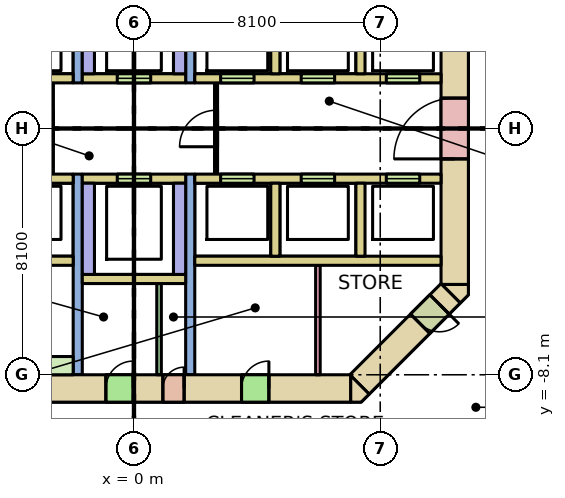
"""IFC4 building model, lengths in metres.
Left out: names, types, materials, properties, quantities, classifications, styles, units other than length and angle.
Written with IfcOpenShell. Run it as: python <this file> out.ifc"""

import sys

from ifc_helpers import new_model, si_unit, direction, frame, frame_2d, origin, place, context, subcontext, project, spatial, polyline, rectangle, outline, extrude, element, fill, save


model = new_model("IFC4")
c1 = context("Model", 3, precision=1e-05, world=origin(), true_north=direction((0.0, 1.0)))
c2 = subcontext(c1, "Body", "Model", "MODEL_VIEW")
j1 = project(units=[si_unit("LENGTHUNIT", "METRE"), si_unit("PLANEANGLEUNIT", "RADIAN")], contexts=[c1])
p1 = place(None, origin())
s1 = spatial("IfcSite", under=j1, at=p1, CompositionType="ELEMENT")
p2 = place(p1, origin())
s2 = spatial("IfcBuilding", under=s1, at=p2, CompositionType="ELEMENT")
p3 = place(p2, frame((0.0, 0.0, -3.6)))
s3 = spatial("IfcBuildingStorey", under=s2, at=p3, CompositionType="ELEMENT", Elevation=-3.6)
p4 = place(p3, frame((-7.13, -8.55, -0.32), z_axis=(0.0, 0.0, 1.0), x_axis=(1.0, 0.0, 0.0)))
e1 = element("IfcWall", 1, at=p4, inside=s3, PredefinedType="SHEAR", context=c2, shape_type="SweptSolid", body=[
    extrude(rectangle(XDim=14.26, YDim=0.9, at=frame_2d((7.13, 0.0))), origin(), (0.0, 0.0, 1.0), 3.6),
])
p5 = place(p4, frame((8.08, 0.0, 0.32)))
e2 = element("IfcOpeningElement", 2, at=p5, cuts=e1, PredefinedType="OPENING", context=c2, shape_type="SweptSolid", body=[
    extrude(rectangle(XDim=0.7, YDim=2.1, at=frame_2d((0.35, 1.05))), frame((0.0, 0.46, 0.0), z_axis=(0.0, -1.0, 0.0), x_axis=(1.0, 0.0, 0.0)), (0.0, 0.0, 1.0), 0.92),
])
p6 = place(p4, frame((6.205, 0.0, 0.32)))
e3 = element("IfcOpeningElement", 3, at=p6, cuts=e1, PredefinedType="OPENING", context=c2, shape_type="SweptSolid", body=[
    extrude(rectangle(XDim=0.9, YDim=2.1, at=frame_2d((0.45, 1.05))), frame((0.0, 0.46, 0.0), z_axis=(0.0, -1.0, 0.0), x_axis=(1.0, 0.0, 0.0)), (0.0, 0.0, 1.0), 0.92),
])
p7 = place(p4, frame((10.667, 0.0, 0.32)))
e4 = element("IfcOpeningElement", 4, at=p7, cuts=e1, PredefinedType="OPENING", context=c2, shape_type="SweptSolid", body=[
    extrude(rectangle(XDim=0.9, YDim=2.1, at=frame_2d((0.45, 1.05))), frame((0.0, 0.46, 0.0), z_axis=(0.0, -1.0, 0.0), x_axis=(1.0, 0.0, 0.0)), (0.0, 0.0, 1.0), 0.92),
])
p8 = place(p3, frame((10.55, -5.13, -0.32), z_axis=(0.0, 0.0, 1.0), x_axis=(0.0, 1.0, 0.0)))
e5 = element("IfcWall", 5, at=p8, inside=s3, PredefinedType="SHEAR", context=c2, shape_type="SweptSolid", body=[
    extrude(rectangle(XDim=10.26, YDim=0.9, at=frame_2d((5.13, 0.0))), origin(), (0.0, 0.0, 1.0), 3.6),
])
p9 = place(p8, frame((4.13, 0.0, 0.32)))
e6 = element("IfcOpeningElement", 6, at=p9, cuts=e5, PredefinedType="OPENING", context=c2, shape_type="SweptSolid", body=[
    extrude(rectangle(XDim=2.0, YDim=2.1, at=frame_2d((1.0, 1.05))), frame((0.0, 0.46, 0.0), z_axis=(0.0, -1.0, 0.0), x_axis=(1.0, 0.0, 0.0)), (0.0, 0.0, 1.0), 0.92),
])
p10 = place(p3, frame((10.418, -5.418, -0.32), z_axis=(0.0, 0.0, 1.0), x_axis=(-0.707106781187, -0.707106781187, 0.0)))
e7 = element("IfcWall", 7, at=p10, inside=s3, PredefinedType="SHEAR", context=c2, shape_type="SweptSolid", body=[
    extrude(rectangle(XDim=4.243, YDim=0.9, at=frame_2d((2.121, 0.0))), origin(), (0.0, 0.0, 1.0), 3.6),
])
p11 = place(p10, frame((0.52, 0.0, 0.32)))
e8 = element("IfcOpeningElement", 8, at=p11, cuts=e7, PredefinedType="OPENING", context=c2, shape_type="SweptSolid", body=[
    extrude(rectangle(XDim=0.9, YDim=2.1, at=frame_2d((0.45, 1.05))), frame((0.0, 0.46, 0.0), z_axis=(0.0, -1.0, 0.0), x_axis=(1.0, 0.0, 0.0)), (0.0, 0.0, 1.0), 0.92),
])
p12 = place(p3, frame((0.0, 0.0, -0.32)))
e9 = element("IfcWall", 9, at=p12, inside=s3, PredefinedType="SHEAR", context=c2, shape_type="SweptSolid", body=[
    extrude(outline(polyline([(7.473, -9.0), (7.13, -9.0), (7.13, -8.13), (7.736, -8.736), (7.473, -9.0)])), origin(), (0.0, 0.0, 1.0), 3.6),
])
p13 = place(p3, frame((0.0, 0.0, -0.32)))
e10 = element("IfcWall", 10, at=p13, inside=s3, PredefinedType="SHEAR", context=c2, shape_type="SweptSolid", body=[
    extrude(outline(polyline([(11.0, -5.473), (10.736, -5.736), (10.13, -5.13), (11.0, -5.13), (11.0, -5.473)])), origin(), (0.0, 0.0, 1.0), 3.6),
])
for number, where, z_axis, x_axis in (
    (11, (-10.1, -4.35, 0.0), (0.0, 0.0, 1.0), (1.0, 0.0, 0.0)),
    (12, (2.0, -4.35, 0.0), (0.0, 0.0, 1.0), (1.0, 0.0, 0.0)),
):
    element("IfcWall", number, at=place(p3, frame(where, z_axis=z_axis, x_axis=x_axis)), inside=s3, PredefinedType="SOLIDWALL", context=c2, shape_type="SweptSolid", body=[
        extrude(rectangle(XDim=8.1, YDim=0.3, at=frame_2d((4.05, 0.0))), origin(), (0.0, 0.0, 1.0), 3.28),
    ])
p14 = place(p3, frame((-10.1, 1.65, 0.0), z_axis=(0.0, 0.0, 1.0), x_axis=(1.0, 0.0, 0.0)))
e13 = element("IfcWall", 13, at=p14, inside=s3, PredefinedType="SOLIDWALL", context=c2, shape_type="SweptSolid", body=[
    extrude(rectangle(XDim=8.1, YDim=0.3, at=frame_2d((4.05, 0.0))), origin(), (0.0, 0.0, 1.0), 3.28),
])
p15 = place(p14, frame((0.7, 0.0, 0.0)))
e14 = element("IfcOpeningElement", 14, at=p15, cuts=e13, PredefinedType="OPENING", context=c2, shape_type="SweptSolid", body=[
    extrude(rectangle(XDim=1.1, YDim=2.1, at=frame_2d((0.55, 1.05))), frame((0.0, 0.16, 0.0), z_axis=(0.0, -1.0, 0.0), x_axis=(1.0, 0.0, 0.0)), (0.0, 0.0, 1.0), 0.32),
])
p16 = place(p14, frame((3.5, 0.0, 0.0)))
e15 = element("IfcOpeningElement", 15, at=p16, cuts=e13, PredefinedType="OPENING", context=c2, shape_type="SweptSolid", body=[
    extrude(rectangle(XDim=1.1, YDim=2.1, at=frame_2d((0.55, 1.05))), frame((0.0, 0.16, 0.0), z_axis=(0.0, -1.0, 0.0), x_axis=(1.0, 0.0, 0.0)), (0.0, 0.0, 1.0), 0.32),
])
p17 = place(p14, frame((6.15, 0.0, 0.0)))
e16 = element("IfcOpeningElement", 16, at=p17, cuts=e13, PredefinedType="OPENING", context=c2, shape_type="SweptSolid", body=[
    extrude(rectangle(XDim=1.1, YDim=2.1, at=frame_2d((0.55, 1.05))), frame((0.0, 0.16, 0.0), z_axis=(0.0, -1.0, 0.0), x_axis=(1.0, 0.0, 0.0)), (0.0, 0.0, 1.0), 0.32),
])
p18 = place(p3, frame((-10.1, -1.65, 0.0), z_axis=(0.0, 0.0, 1.0), x_axis=(1.0, 0.0, 0.0)))
e17 = element("IfcWall", 17, at=p18, inside=s3, PredefinedType="SOLIDWALL", context=c2, shape_type="SweptSolid", body=[
    extrude(rectangle(XDim=8.1, YDim=0.3, at=frame_2d((4.05, 0.0))), origin(), (0.0, 0.0, 1.0), 3.28),
])
p19 = place(p18, frame((0.7, 0.0, 0.0)))
e18 = element("IfcOpeningElement", 18, at=p19, cuts=e17, PredefinedType="OPENING", context=c2, shape_type="SweptSolid", body=[
    extrude(rectangle(XDim=1.1, YDim=2.1, at=frame_2d((0.55, 1.05))), frame((0.0, 0.16, 0.0), z_axis=(0.0, -1.0, 0.0), x_axis=(1.0, 0.0, 0.0)), (0.0, 0.0, 1.0), 0.32),
])
p20 = place(p18, frame((3.5, 0.0, 0.0)))
e19 = element("IfcOpeningElement", 19, at=p20, cuts=e17, PredefinedType="OPENING", context=c2, shape_type="SweptSolid", body=[
    extrude(rectangle(XDim=1.1, YDim=2.1, at=frame_2d((0.55, 1.05))), frame((0.0, 0.16, 0.0), z_axis=(0.0, -1.0, 0.0), x_axis=(1.0, 0.0, 0.0)), (0.0, 0.0, 1.0), 0.32),
])
p21 = place(p18, frame((6.15, 0.0, 0.0)))
e20 = element("IfcOpeningElement", 20, at=p21, cuts=e17, PredefinedType="OPENING", context=c2, shape_type="SweptSolid", body=[
    extrude(rectangle(XDim=1.1, YDim=2.1, at=frame_2d((0.55, 1.05))), frame((0.0, 0.16, 0.0), z_axis=(0.0, -1.0, 0.0), x_axis=(1.0, 0.0, 0.0)), (0.0, 0.0, 1.0), 0.32),
])
p22 = place(p3, frame((2.0, 1.65, 0.0), z_axis=(0.0, 0.0, 1.0), x_axis=(1.0, 0.0, 0.0)))
e21 = element("IfcWall", 21, at=p22, inside=s3, PredefinedType="SOLIDWALL", context=c2, shape_type="SweptSolid", body=[
    extrude(rectangle(XDim=8.1, YDim=0.3, at=frame_2d((4.05, 0.0))), origin(), (0.0, 0.0, 1.0), 3.28),
])
p23 = place(p22, frame((0.85, 0.0, 0.0)))
e22 = element("IfcOpeningElement", 22, at=p23, cuts=e21, PredefinedType="OPENING", context=c2, shape_type="SweptSolid", body=[
    extrude(rectangle(XDim=1.1, YDim=2.1, at=frame_2d((0.55, 1.05))), frame((0.0, 0.16, 0.0), z_axis=(0.0, -1.0, 0.0), x_axis=(1.0, 0.0, 0.0)), (0.0, 0.0, 1.0), 0.32),
])
p24 = place(p22, frame((3.5, 0.0, 0.0)))
e23 = element("IfcOpeningElement", 23, at=p24, cuts=e21, PredefinedType="OPENING", context=c2, shape_type="SweptSolid", body=[
    extrude(rectangle(XDim=1.1, YDim=2.1, at=frame_2d((0.55, 1.05))), frame((0.0, 0.16, 0.0), z_axis=(0.0, -1.0, 0.0), x_axis=(1.0, 0.0, 0.0)), (0.0, 0.0, 1.0), 0.32),
])
p25 = place(p22, frame((6.3, 0.0, 0.0)))
e24 = element("IfcOpeningElement", 24, at=p25, cuts=e21, PredefinedType="OPENING", context=c2, shape_type="SweptSolid", body=[
    extrude(rectangle(XDim=1.1, YDim=2.1, at=frame_2d((0.55, 1.05))), frame((0.0, 0.16, 0.0), z_axis=(0.0, -1.0, 0.0), x_axis=(1.0, 0.0, 0.0)), (0.0, 0.0, 1.0), 0.32),
])
p26 = place(p3, frame((2.0, -1.65, 0.0), z_axis=(0.0, 0.0, 1.0), x_axis=(1.0, 0.0, 0.0)))
e25 = element("IfcWall", 25, at=p26, inside=s3, PredefinedType="SOLIDWALL", context=c2, shape_type="SweptSolid", body=[
    extrude(rectangle(XDim=8.1, YDim=0.3, at=frame_2d((4.05, 0.0))), origin(), (0.0, 0.0, 1.0), 3.28),
])
p27 = place(p26, frame((0.85, 0.0, 0.0)))
e26 = element("IfcOpeningElement", 26, at=p27, cuts=e25, PredefinedType="OPENING", context=c2, shape_type="SweptSolid", body=[
    extrude(rectangle(XDim=1.1, YDim=2.1, at=frame_2d((0.55, 1.05))), frame((0.0, 0.16, 0.0), z_axis=(0.0, -1.0, 0.0), x_axis=(1.0, 0.0, 0.0)), (0.0, 0.0, 1.0), 0.32),
])
p28 = place(p26, frame((3.5, 0.0, 0.0)))
e27 = element("IfcOpeningElement", 27, at=p28, cuts=e25, PredefinedType="OPENING", context=c2, shape_type="SweptSolid", body=[
    extrude(rectangle(XDim=1.1, YDim=2.1, at=frame_2d((0.55, 1.05))), frame((0.0, 0.16, 0.0), z_axis=(0.0, -1.0, 0.0), x_axis=(1.0, 0.0, 0.0)), (0.0, 0.0, 1.0), 0.32),
])
p29 = place(p26, frame((6.3, 0.0, 0.0)))
e28 = element("IfcOpeningElement", 28, at=p29, cuts=e25, PredefinedType="OPENING", context=c2, shape_type="SweptSolid", body=[
    extrude(rectangle(XDim=1.1, YDim=2.1, at=frame_2d((0.55, 1.05))), frame((0.0, 0.16, 0.0), z_axis=(0.0, -1.0, 0.0), x_axis=(1.0, 0.0, 0.0)), (0.0, 0.0, 1.0), 0.32),
])
for number, where, z_axis, x_axis in (
    (29, (4.65, 1.8, 0.0), (0.0, 0.0, 1.0), (0.0, 1.0, 0.0)),
    (30, (4.65, -4.2, 0.0), (0.0, 0.0, 1.0), (0.0, 1.0, 0.0)),
    (31, (7.45, 1.8, 0.0), (0.0, 0.0, 1.0), (0.0, 1.0, 0.0)),
    (32, (7.45, -4.2, 0.0), (0.0, 0.0, 1.0), (0.0, 1.0, 0.0)),
):
    element("IfcWall", number, at=place(p3, frame(where, z_axis=z_axis, x_axis=x_axis)), inside=s3, PredefinedType="SOLIDWALL", context=c2, shape_type="SweptSolid", body=[
        extrude(rectangle(XDim=2.4, YDim=0.3, at=frame_2d((1.2, 0.0))), origin(), (0.0, 0.0, 1.0), 3.28),
    ])
for number, where, z_axis, x_axis in (
    (33, (-1.85, 1.5, 0.0), (0.0, 0.0, 1.0), (0.0, 1.0, 0.0)),
    (34, (-1.85, -8.1, 0.0), (0.0, 0.0, 1.0), (0.0, 1.0, 0.0)),
    (35, (1.85, 1.5, 0.0), (0.0, 0.0, 1.0), (0.0, 1.0, 0.0)),
    (36, (1.85, -8.1, 0.0), (0.0, 0.0, 1.0), (0.0, 1.0, 0.0)),
):
    element("IfcWall", number, at=place(p3, frame(where, z_axis=z_axis, x_axis=x_axis)), inside=s3, PredefinedType="SHEAR", context=c2, shape_type="SweptSolid", body=[
        extrude(rectangle(XDim=6.6, YDim=0.3, at=frame_2d((3.3, 0.0))), origin(), (0.0, 0.0, 1.0), 3.28),
    ])
p30 = place(p3, frame((-1.7, 1.65, 0.0), z_axis=(0.0, 0.0, 1.0), x_axis=(1.0, 0.0, 0.0)))
e37 = element("IfcWall", 37, at=p30, inside=s3, PredefinedType="SOLIDWALL", context=c2, shape_type="SweptSolid", body=[
    extrude(rectangle(XDim=3.4, YDim=0.3, at=frame_2d((1.7, 0.0))), origin(), (0.0, 0.0, 1.0), 3.28),
])
p31 = place(p30, frame((1.15, 0.0, 0.0)))
e38 = element("IfcOpeningElement", 38, at=p31, cuts=e37, PredefinedType="OPENING", context=c2, shape_type="SweptSolid", body=[
    extrude(rectangle(XDim=1.1, YDim=2.1, at=frame_2d((0.55, 1.05))), frame((0.0, 0.16, 0.0), z_axis=(0.0, -1.0, 0.0), x_axis=(1.0, 0.0, 0.0)), (0.0, 0.0, 1.0), 0.32),
])
p32 = place(p3, frame((-1.7, -1.65, 0.0), z_axis=(0.0, 0.0, 1.0), x_axis=(1.0, 0.0, 0.0)))
e39 = element("IfcWall", 39, at=p32, inside=s3, PredefinedType="SOLIDWALL", context=c2, shape_type="SweptSolid", body=[
    extrude(rectangle(XDim=3.4, YDim=0.3, at=frame_2d((1.7, 0.0))), origin(), (0.0, 0.0, 1.0), 3.28),
])
p33 = place(p32, frame((1.15, 0.0, 0.0)))
e40 = element("IfcOpeningElement", 40, at=p33, cuts=e39, PredefinedType="OPENING", context=c2, shape_type="SweptSolid", body=[
    extrude(rectangle(XDim=1.1, YDim=2.1, at=frame_2d((0.55, 1.05))), frame((0.0, 0.16, 0.0), z_axis=(0.0, -1.0, 0.0), x_axis=(1.0, 0.0, 0.0)), (0.0, 0.0, 1.0), 0.32),
])
for number, where, z_axis, x_axis in (
    (41, (-1.5, 1.8, 0.0), (0.0, 0.0, 1.0), (0.0, 1.0, 0.0)),
    (42, (-1.5, -4.8, 0.0), (0.0, 0.0, 1.0), (0.0, 1.0, 0.0)),
    (43, (1.5, 1.8, 0.0), (0.0, 0.0, 1.0), (0.0, 1.0, 0.0)),
    (44, (1.5, -4.8, 0.0), (0.0, 0.0, 1.0), (0.0, 1.0, 0.0)),
):
    element("IfcWall", number, at=place(p3, frame(where, z_axis=z_axis, x_axis=x_axis)), inside=s3, PredefinedType="SOLIDWALL", context=c2, shape_type="SweptSolid", body=[
        extrude(rectangle(XDim=3.0, YDim=0.4, at=frame_2d((1.5, 0.0))), origin(), (0.0, 0.0, 1.0), 3.28),
    ])
p34 = place(p3, frame((-1.7, -4.95, 0.0), z_axis=(0.0, 0.0, 1.0), x_axis=(1.0, 0.0, 0.0)))
e45 = element("IfcWall", 45, at=p34, inside=s3, PredefinedType="SOLIDWALL", context=c2, shape_type="SweptSolid", body=[
    extrude(rectangle(XDim=3.4, YDim=0.3, at=frame_2d((1.7, 0.0))), origin(), (0.0, 0.0, 1.0), 3.28),
])
p35 = place(p3, frame((-7.37, -7.8, 0.0), z_axis=(0.0, 0.0, 1.0), x_axis=(1.0, 0.0, 0.0)))
e46 = element("IfcWall", 46, at=p35, inside=s3, PredefinedType="SHEAR", context=c2, shape_type="SweptSolid", body=[
    extrude(rectangle(XDim=5.37, YDim=0.6, at=frame_2d((2.685, 0.0))), origin(), (0.0, 0.0, 1.0), 3.28),
])
p36 = place(p3, frame((-2.7, -1.5, 0.0), z_axis=(0.0, 0.0, 1.0), x_axis=(0.0, 1.0, 0.0)))
e47 = element("IfcWall", 47, at=p36, inside=s3, PredefinedType="PARTITIONING", context=c2, shape_type="SweptSolid", body=[
    extrude(rectangle(XDim=3.0, YDim=0.1, at=frame_2d((1.5, 0.0))), origin(), (0.0, 0.0, 1.0), 3.28),
])
p37 = place(p36, frame((0.9, 0.0, 0.0)))
e48 = element("IfcOpeningElement", 48, at=p37, cuts=e47, PredefinedType="OPENING", context=c2, shape_type="SweptSolid", body=[
    extrude(rectangle(XDim=1.2, YDim=2.1, at=frame_2d((0.6, 1.05))), frame((0.0, 0.06, 0.0), z_axis=(0.0, -1.0, 0.0), x_axis=(1.0, 0.0, 0.0)), (0.0, 0.0, 1.0), 0.12),
])
p38 = place(p3, frame((2.7, -1.5, 0.0), z_axis=(0.0, 0.0, 1.0), x_axis=(0.0, 1.0, 0.0)))
e49 = element("IfcWall", 49, at=p38, inside=s3, PredefinedType="PARTITIONING", context=c2, shape_type="SweptSolid", body=[
    extrude(rectangle(XDim=3.0, YDim=0.1, at=frame_2d((1.5, 0.0))), origin(), (0.0, 0.0, 1.0), 3.28),
])
p39 = place(p38, frame((0.9, 0.0, 0.0)))
e50 = element("IfcOpeningElement", 50, at=p39, cuts=e49, PredefinedType="OPENING", context=c2, shape_type="SweptSolid", body=[
    extrude(rectangle(XDim=1.2, YDim=2.1, at=frame_2d((0.6, 1.05))), frame((0.0, 0.06, 0.0), z_axis=(0.0, -1.0, 0.0), x_axis=(1.0, 0.0, 0.0)), (0.0, 0.0, 1.0), 0.12),
])
p40 = place(p3, frame((0.825, -8.1, 0.0), z_axis=(0.0, 0.0, 1.0), x_axis=(0.0, 1.0, 0.0)))
e51 = element("IfcWall", 51, at=p40, inside=s3, PredefinedType="PARTITIONING", context=c2, shape_type="SweptSolid", body=[
    extrude(rectangle(XDim=3.0, YDim=0.15, at=frame_2d((1.5, 0.0))), origin(), (0.0, 0.0, 1.0), 3.28),
])
p41 = place(p3, frame((6.05, -8.1, 0.0), z_axis=(0.0, 0.0, 1.0), x_axis=(0.0, 1.0, 0.0)))
e52 = element("IfcWall", 52, at=p41, inside=s3, PredefinedType="PARTITIONING", context=c2, shape_type="SweptSolid", body=[
    extrude(rectangle(XDim=3.6, YDim=0.15, at=frame_2d((1.8, 0.0))), origin(), (0.0, 0.0, 1.0), 3.28),
])
p42 = place(p23, origin())
e53 = element("IfcDoor", 53, at=p42, inside=s3, OperationType="DOUBLE_DOOR_SLIDING", PredefinedType="DOOR", context=c2, shape_type="SweptSolid", body=[
    extrude(rectangle(XDim=1.1, YDim=2.1, at=frame_2d((0.55, 1.05))), frame((0.0, 0.025, 0.0), z_axis=(0.0, -1.0, 0.0), x_axis=(1.0, 0.0, 0.0)), (0.0, 0.0, 1.0), 0.05),
])
fill(e22, e53)
p43 = place(p24, origin())
e54 = element("IfcDoor", 54, at=p43, inside=s3, OperationType="DOUBLE_DOOR_SLIDING", PredefinedType="DOOR", context=c2, shape_type="SweptSolid", body=[
    extrude(rectangle(XDim=1.1, YDim=2.1, at=frame_2d((0.55, 1.05))), frame((0.0, 0.025, 0.0), z_axis=(0.0, -1.0, 0.0), x_axis=(1.0, 0.0, 0.0)), (0.0, 0.0, 1.0), 0.05),
])
fill(e23, e54)
p44 = place(p25, origin())
e55 = element("IfcDoor", 55, at=p44, inside=s3, OperationType="DOUBLE_DOOR_SLIDING", PredefinedType="DOOR", context=c2, shape_type="SweptSolid", body=[
    extrude(rectangle(XDim=1.1, YDim=2.1, at=frame_2d((0.55, 1.05))), frame((0.0, 0.025, 0.0), z_axis=(0.0, -1.0, 0.0), x_axis=(1.0, 0.0, 0.0)), (0.0, 0.0, 1.0), 0.05),
])
fill(e24, e55)
p45 = place(p27, origin())
e56 = element("IfcDoor", 56, at=p45, inside=s3, OperationType="DOUBLE_DOOR_SLIDING", PredefinedType="DOOR", context=c2, shape_type="SweptSolid", body=[
    extrude(rectangle(XDim=1.1, YDim=2.1, at=frame_2d((0.55, 1.05))), frame((0.0, 0.025, 0.0), z_axis=(0.0, -1.0, 0.0), x_axis=(1.0, 0.0, 0.0)), (0.0, 0.0, 1.0), 0.05),
])
fill(e26, e56)
p46 = place(p28, origin())
e57 = element("IfcDoor", 57, at=p46, inside=s3, OperationType="DOUBLE_DOOR_SLIDING", PredefinedType="DOOR", context=c2, shape_type="SweptSolid", body=[
    extrude(rectangle(XDim=1.1, YDim=2.1, at=frame_2d((0.55, 1.05))), frame((0.0, 0.025, 0.0), z_axis=(0.0, -1.0, 0.0), x_axis=(1.0, 0.0, 0.0)), (0.0, 0.0, 1.0), 0.05),
])
fill(e27, e57)
p47 = place(p29, origin())
e58 = element("IfcDoor", 58, at=p47, inside=s3, OperationType="DOUBLE_DOOR_SLIDING", PredefinedType="DOOR", context=c2, shape_type="SweptSolid", body=[
    extrude(rectangle(XDim=1.1, YDim=2.1, at=frame_2d((0.55, 1.05))), frame((0.0, 0.025, 0.0), z_axis=(0.0, -1.0, 0.0), x_axis=(1.0, 0.0, 0.0)), (0.0, 0.0, 1.0), 0.05),
])
fill(e28, e58)
p48 = place(p31, origin())
e59 = element("IfcDoor", 59, at=p48, inside=s3, OperationType="DOUBLE_DOOR_SLIDING", PredefinedType="DOOR", context=c2, shape_type="SweptSolid", body=[
    extrude(rectangle(XDim=1.1, YDim=2.1, at=frame_2d((0.55, 1.05))), frame((0.0, 0.025, 0.0), z_axis=(0.0, -1.0, 0.0), x_axis=(1.0, 0.0, 0.0)), (0.0, 0.0, 1.0), 0.05),
])
fill(e38, e59)
p49 = place(p33, origin())
e60 = element("IfcDoor", 60, at=p49, inside=s3, OperationType="DOUBLE_DOOR_SLIDING", PredefinedType="DOOR", context=c2, shape_type="SweptSolid", body=[
    extrude(rectangle(XDim=1.1, YDim=2.1, at=frame_2d((0.55, 1.05))), frame((0.0, 0.025, 0.0), z_axis=(0.0, -1.0, 0.0), x_axis=(1.0, 0.0, 0.0)), (0.0, 0.0, 1.0), 0.05),
])
fill(e40, e60)
p50 = place(p9, origin())
e61 = element("IfcDoor", 61, at=p50, inside=s3, OperationType="DOUBLE_DOOR_SINGLE_SWING", PredefinedType="DOOR", context=c2, shape_type="SweptSolid", body=[
    extrude(rectangle(XDim=2.0, YDim=2.1, at=frame_2d((1.0, 1.05))), frame((0.0, 0.025, 0.0), z_axis=(0.0, -1.0, 0.0), x_axis=(1.0, 0.0, 0.0)), (0.0, 0.0, 1.0), 0.05),
])
fill(e6, e61)
p51 = place(p37, origin())
e62 = element("IfcDoor", 62, at=p51, inside=s3, OperationType="SINGLE_SWING_LEFT", PredefinedType="DOOR", context=c2, shape_type="SweptSolid", body=[
    extrude(rectangle(XDim=1.2, YDim=2.1, at=frame_2d((0.6, 1.05))), frame((0.0, 0.025, 0.0), z_axis=(0.0, -1.0, 0.0), x_axis=(1.0, 0.0, 0.0)), (0.0, 0.0, 1.0), 0.05),
])
fill(e48, e62)
p52 = place(p39, origin())
e63 = element("IfcDoor", 63, at=p52, inside=s3, OperationType="SINGLE_SWING_LEFT", PredefinedType="DOOR", context=c2, shape_type="SweptSolid", body=[
    extrude(rectangle(XDim=1.2, YDim=2.1, at=frame_2d((0.6, 1.05))), frame((0.0, 0.025, 0.0), z_axis=(0.0, -1.0, 0.0), x_axis=(1.0, 0.0, 0.0)), (0.0, 0.0, 1.0), 0.05),
])
fill(e50, e63)
p53 = place(p5, origin())
e64 = element("IfcDoor", 64, at=p53, inside=s3, OperationType="SINGLE_SWING_RIGHT", PredefinedType="DOOR", context=c2, shape_type="SweptSolid", body=[
    extrude(rectangle(XDim=0.7, YDim=2.1, at=frame_2d((0.35, 1.05))), frame((0.0, 0.025, 0.0), z_axis=(0.0, -1.0, 0.0), x_axis=(1.0, 0.0, 0.0)), (0.0, 0.0, 1.0), 0.05),
])
fill(e2, e64)
p54 = place(p6, origin())
e65 = element("IfcDoor", 65, at=p54, inside=s3, OperationType="SINGLE_SWING_RIGHT", PredefinedType="DOOR", context=c2, shape_type="SweptSolid", body=[
    extrude(rectangle(XDim=0.9, YDim=2.1, at=frame_2d((0.45, 1.05))), frame((0.0, 0.025, 0.0), z_axis=(0.0, -1.0, 0.0), x_axis=(1.0, 0.0, 0.0)), (0.0, 0.0, 1.0), 0.05),
])
fill(e3, e65)
p55 = place(p7, origin())
e66 = element("IfcDoor", 66, at=p55, inside=s3, OperationType="SINGLE_SWING_RIGHT", PredefinedType="DOOR", context=c2, shape_type="SweptSolid", body=[
    extrude(rectangle(XDim=0.9, YDim=2.1, at=frame_2d((0.45, 1.05))), frame((0.0, 0.025, 0.0), z_axis=(0.0, -1.0, 0.0), x_axis=(1.0, 0.0, 0.0)), (0.0, 0.0, 1.0), 0.05),
])
fill(e4, e66)
p56 = place(p11, origin())
e67 = element("IfcDoor", 67, at=p56, inside=s3, OperationType="SINGLE_SWING_LEFT", PredefinedType="DOOR", context=c2, shape_type="SweptSolid", body=[
    extrude(rectangle(XDim=0.9, YDim=2.1, at=frame_2d((0.45, 1.05))), frame((0.0, 0.025, 0.0), z_axis=(0.0, -1.0, 0.0), x_axis=(1.0, 0.0, 0.0)), (0.0, 0.0, 1.0), 0.05),
])
fill(e8, e67)
save(model, sys.argv[1])
